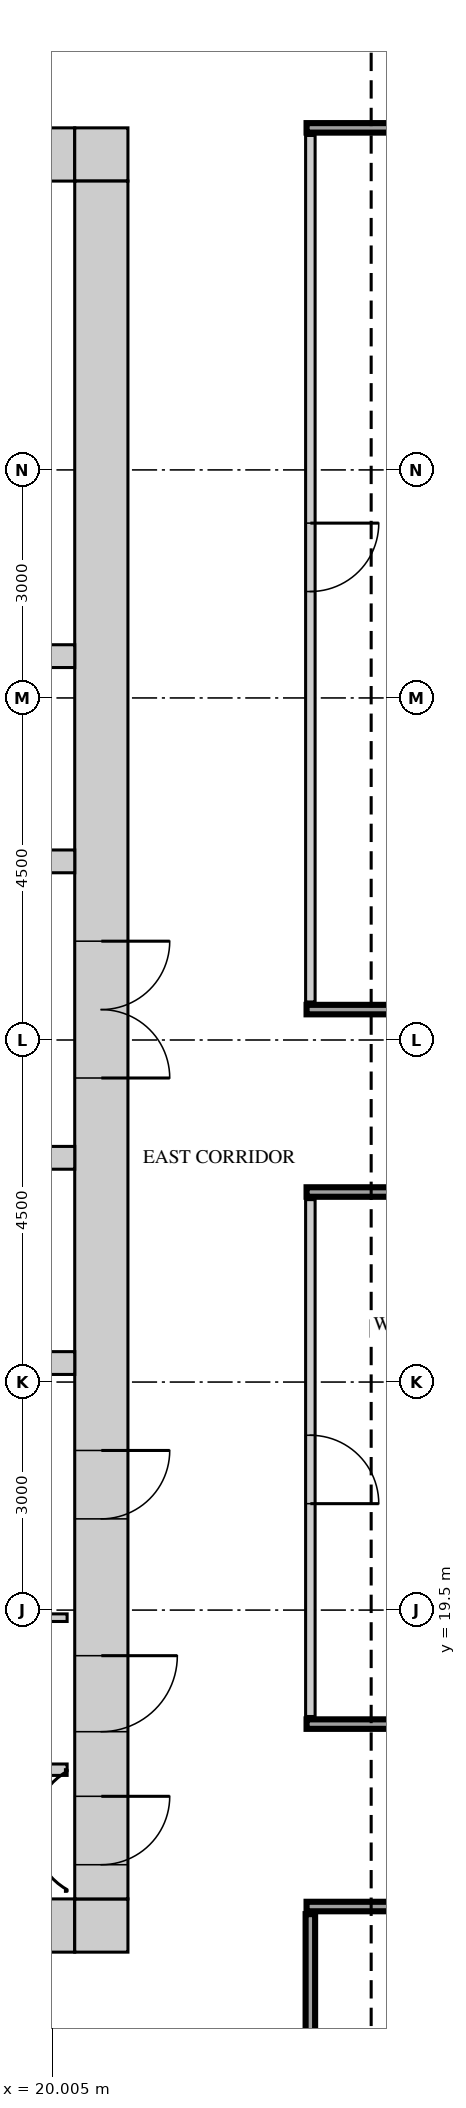
"""IFC4 building model, lengths in metres.
Left out: names, types, materials, properties, quantities, classifications, styles, units other than length and angle.
Written with IfcOpenShell. Run it as: python <this file> out.ifc"""

import sys

from ifc_helpers import new_model, si_unit, direction, frame, frame_2d, origin, place, context, subcontext, project, spatial, rectangle, extrude, source, transform, mapped, element, fill, save


model = new_model("IFC4")
c1 = context("Model", 3, precision=1e-05, world=origin(), true_north=direction((0.0, 1.0)))
c2 = subcontext(c1, "Body", "Model", "MODEL_VIEW")
j1 = project(units=[si_unit("LENGTHUNIT", "METRE"), si_unit("PLANEANGLEUNIT", "RADIAN")], contexts=[c1])
p1 = place(None, origin())
s1 = spatial("IfcSite", under=j1, at=p1, CompositionType="ELEMENT")
p2 = place(p1, origin())
s2 = spatial("IfcBuilding", under=s1, at=p2, CompositionType="ELEMENT")
p3 = place(p2, frame((0.0, 0.0, 238.2)))
s3 = spatial("IfcBuildingStorey", under=s2, at=p3, CompositionType="ELEMENT", Elevation=238.2)
m1 = source(origin(), c2, "Body", "SweptSolid", [
    extrude(rectangle(XDim=13.6, YDim=0.7, at=frame_2d((6.8, 0.0))), origin(), (0.0, 0.0, 1.0), 3.75),
])
p4 = place(p3, frame((6.7, 38.65, 0.0), z_axis=(0.0, 0.0, 1.0), x_axis=(1.0, 0.0, 0.0)))
e1 = element("IfcWall", 1, at=p4, inside=s3, PredefinedType="SHEAR", context=c2, shape_type="MappedRepresentation", body=[
    mapped(m1, transform((0.0, 0.0, 0.0))),
])
m2 = source(origin(), c2, "Body", "SweptSolid", [
    extrude(rectangle(XDim=0.9, YDim=2.1, at=frame_2d((0.45, 1.05))), frame((0.0, 0.36, 0.0), z_axis=(0.0, -1.0, 0.0), x_axis=(1.0, 0.0, 0.0)), (0.0, 0.0, 1.0), 0.72),
])
p5 = place(p4, frame((1.85, 0.0, 0.0)))
e2 = element("IfcOpeningElement", 2, at=p5, cuts=e1, PredefinedType="OPENING", context=c2, shape_type="MappedRepresentation", body=[
    mapped(m2, transform((0.0, 0.0, 0.0))),
])
p6 = place(p4, frame((6.3, 0.0, 0.0)))
e3 = element("IfcOpeningElement", 3, at=p6, cuts=e1, PredefinedType="OPENING", context=c2, shape_type="MappedRepresentation", body=[
    mapped(m2, transform((0.0, 0.0, 0.0))),
])
p7 = place(p4, frame((10.8, 0.0, 0.0)))
e4 = element("IfcOpeningElement", 4, at=p7, cuts=e1, PredefinedType="OPENING", context=c2, shape_type="MappedRepresentation", body=[
    mapped(m2, transform((0.0, 0.0, 0.0))),
])
m3 = source(origin(), c2, "Body", "SweptSolid", [
    extrude(rectangle(XDim=0.7, YDim=0.7, at=frame_2d((0.35, 0.0))), origin(), (0.0, 0.0, 1.0), 3.75),
])
p8 = place(p3, frame((20.3, 38.65, 0.0), z_axis=(0.0, 0.0, 1.0), x_axis=(1.0, 0.0, 0.0)))
e5 = element("IfcWall", 5, at=p8, inside=s3, PredefinedType="SHEAR", context=c2, shape_type="MappedRepresentation", body=[
    mapped(m3, transform((0.0, 0.0, 0.0))),
])
p9 = place(p3, frame((6.7, 15.35, 0.0), z_axis=(0.0, 0.0, 1.0), x_axis=(1.0, 0.0, 0.0)))
e6 = element("IfcWall", 6, at=p9, inside=s3, PredefinedType="SHEAR", context=c2, shape_type="MappedRepresentation", body=[
    mapped(m1, transform((0.0, 0.0, 0.0))),
])
m4 = source(origin(), c2, "Body", "SweptSolid", [
    extrude(rectangle(XDim=1.2, YDim=2.1, at=frame_2d((0.6, 1.05))), frame((0.0, 0.36, 0.0), z_axis=(0.0, -1.0, 0.0), x_axis=(1.0, 0.0, 0.0)), (0.0, 0.0, 1.0), 0.72),
])
p10 = place(p9, frame((5.5, 0.0, 0.0)))
e7 = element("IfcOpeningElement", 7, at=p10, cuts=e6, PredefinedType="OPENING", context=c2, shape_type="MappedRepresentation", body=[
    mapped(m4, transform((0.0, 0.0, 0.0))),
])
p11 = place(p9, frame((2.15, 0.0, 0.0)))
e8 = element("IfcOpeningElement", 8, at=p11, cuts=e6, PredefinedType="OPENING", context=c2, shape_type="MappedRepresentation", body=[
    mapped(m4, transform((0.0, 0.0, 0.0))),
])
m5 = source(origin(), c2, "Body", "SweptSolid", [
    extrude(rectangle(XDim=1.0, YDim=2.1, at=frame_2d((0.5, 1.05))), frame((0.0, 0.36, 0.0), z_axis=(0.0, -1.0, 0.0), x_axis=(1.0, 0.0, 0.0)), (0.0, 0.0, 1.0), 0.72),
])
p12 = place(p9, frame((8.0, 0.0, 0.0)))
e9 = element("IfcOpeningElement", 9, at=p12, cuts=e6, PredefinedType="OPENING", context=c2, shape_type="MappedRepresentation", body=[
    mapped(m5, transform((0.0, 0.0, 0.0))),
])
p13 = place(p3, frame((20.3, 15.35, 0.0), z_axis=(0.0, 0.0, 1.0), x_axis=(1.0, 0.0, 0.0)))
e10 = element("IfcWall", 10, at=p13, inside=s3, PredefinedType="SHEAR", context=c2, shape_type="MappedRepresentation", body=[
    mapped(m3, transform((0.0, 0.0, 0.0))),
])
m6 = source(origin(), c2, "Body", "SweptSolid", [
    extrude(rectangle(XDim=22.6, YDim=0.7, at=frame_2d((11.3, 0.0))), origin(), (0.0, 0.0, 1.0), 3.75),
])
p14 = place(p3, frame((20.65, 15.7, 0.0), z_axis=(0.0, 0.0, 1.0), x_axis=(0.0, 1.0, 0.0)))
e11 = element("IfcWall", 11, at=p14, inside=s3, PredefinedType="SHEAR", context=c2, shape_type="MappedRepresentation", body=[
    mapped(m6, transform((0.0, 0.0, 0.0))),
])
m7 = source(origin(), c2, "Body", "SweptSolid", [
    extrude(rectangle(XDim=1.8, YDim=2.1, at=frame_2d((0.9, 1.05))), frame((0.0, 0.36, 0.0), z_axis=(0.0, -1.0, 0.0), x_axis=(1.0, 0.0, 0.0)), (0.0, 0.0, 1.0), 0.72),
])
p15 = place(p14, frame((10.8, 0.0, 0.0)))
e12 = element("IfcOpeningElement", 12, at=p15, cuts=e11, PredefinedType="OPENING", context=c2, shape_type="MappedRepresentation", body=[
    mapped(m7, transform((0.0, 0.0, 0.0))),
])
p16 = place(p14, frame((0.45, 0.0, 0.0)))
e13 = element("IfcOpeningElement", 13, at=p16, cuts=e11, PredefinedType="OPENING", context=c2, shape_type="MappedRepresentation", body=[
    mapped(m2, transform((0.0, 0.0, 0.0))),
])
p17 = place(p14, frame((2.2, 0.0, 0.0)))
e14 = element("IfcOpeningElement", 14, at=p17, cuts=e11, PredefinedType="OPENING", context=c2, shape_type="MappedRepresentation", body=[
    mapped(m5, transform((0.0, 0.0, 0.0))),
])
p18 = place(p14, frame((5.0, 0.0, 0.0)))
e15 = element("IfcOpeningElement", 15, at=p18, cuts=e11, PredefinedType="OPENING", context=c2, shape_type="MappedRepresentation", body=[
    mapped(m2, transform((0.0, 0.0, 0.0))),
])
m8 = source(origin(), c2, "Body", "SweptSolid", [
    extrude(rectangle(XDim=13.6, YDim=0.3, at=frame_2d((6.8, 0.0))), origin(), (0.0, 0.0, 1.0), 3.75),
])
for number, where, z_axis, x_axis in (
    (16, (6.7, 22.75, 0.0), (0.0, 0.0, 1.0), (1.0, 0.0, 0.0)),
    (17, (6.7, 32.05, 0.0), (0.0, 0.0, 1.0), (1.0, 0.0, 0.0)),
):
    element("IfcWall", number, at=place(p3, frame(where, z_axis=z_axis, x_axis=x_axis)), inside=s3, PredefinedType="STANDARD", context=c2, shape_type="MappedRepresentation", body=[
        mapped(m8, transform((0.0, 0.0, 0.0))),
    ])
p19 = place(p3, frame((6.7, 29.35, 0.0), z_axis=(0.0, 0.0, 1.0), x_axis=(1.0, 0.0, 0.0)))
e18 = element("IfcWall", 18, at=p19, inside=s3, PredefinedType="STANDARD", context=c2, shape_type="MappedRepresentation", body=[
    mapped(m8, transform((0.0, 0.0, 0.0))),
])
m9 = source(origin(), c2, "Body", "SweptSolid", [
    extrude(rectangle(XDim=1.2, YDim=2.1, at=frame_2d((0.6, 1.05))), frame((0.0, 0.16, 0.0), z_axis=(0.0, -1.0, 0.0), x_axis=(1.0, 0.0, 0.0)), (0.0, 0.0, 1.0), 0.32),
])
p20 = place(p19, frame((1.05, 0.0, 0.0)))
e19 = element("IfcOpeningElement", 19, at=p20, cuts=e18, PredefinedType="OPENING", context=c2, shape_type="MappedRepresentation", body=[
    mapped(m9, transform((0.0, 0.0, 0.0))),
])
p21 = place(p19, frame((3.6, 0.0, 0.0)))
e20 = element("IfcOpeningElement", 20, at=p21, cuts=e18, PredefinedType="OPENING", context=c2, shape_type="MappedRepresentation", body=[
    mapped(m9, transform((0.0, 0.0, 0.0))),
])
p22 = place(p19, frame((6.15, 0.0, 0.0)))
e21 = element("IfcOpeningElement", 21, at=p22, cuts=e18, PredefinedType="OPENING", context=c2, shape_type="MappedRepresentation", body=[
    mapped(m9, transform((0.0, 0.0, 0.0))),
])
p23 = place(p19, frame((8.7, 0.0, 0.0)))
e22 = element("IfcOpeningElement", 22, at=p23, cuts=e18, PredefinedType="OPENING", context=c2, shape_type="MappedRepresentation", body=[
    mapped(m9, transform((0.0, 0.0, 0.0))),
])
p24 = place(p19, frame((11.25, 0.0, 0.0)))
e23 = element("IfcOpeningElement", 23, at=p24, cuts=e18, PredefinedType="OPENING", context=c2, shape_type="MappedRepresentation", body=[
    mapped(m9, transform((0.0, 0.0, 0.0))),
])
p25 = place(p3, frame((6.7, 25.45, 0.0), z_axis=(0.0, 0.0, 1.0), x_axis=(1.0, 0.0, 0.0)))
e24 = element("IfcWall", 24, at=p25, inside=s3, PredefinedType="STANDARD", context=c2, shape_type="MappedRepresentation", body=[
    mapped(m8, transform((0.0, 0.0, 0.0))),
])
p26 = place(p25, frame((1.05, 0.0, 0.0)))
e25 = element("IfcOpeningElement", 25, at=p26, cuts=e24, PredefinedType="OPENING", context=c2, shape_type="MappedRepresentation", body=[
    mapped(m9, transform((0.0, 0.0, 0.0))),
])
p27 = place(p25, frame((3.6, 0.0, 0.0)))
e26 = element("IfcOpeningElement", 26, at=p27, cuts=e24, PredefinedType="OPENING", context=c2, shape_type="MappedRepresentation", body=[
    mapped(m9, transform((0.0, 0.0, 0.0))),
])
p28 = place(p25, frame((6.15, 0.0, 0.0)))
e27 = element("IfcOpeningElement", 27, at=p28, cuts=e24, PredefinedType="OPENING", context=c2, shape_type="MappedRepresentation", body=[
    mapped(m9, transform((0.0, 0.0, 0.0))),
])
p29 = place(p25, frame((8.7, 0.0, 0.0)))
e28 = element("IfcOpeningElement", 28, at=p29, cuts=e24, PredefinedType="OPENING", context=c2, shape_type="MappedRepresentation", body=[
    mapped(m9, transform((0.0, 0.0, 0.0))),
])
p30 = place(p25, frame((11.25, 0.0, 0.0)))
e29 = element("IfcOpeningElement", 29, at=p30, cuts=e24, PredefinedType="OPENING", context=c2, shape_type="MappedRepresentation", body=[
    mapped(m9, transform((0.0, 0.0, 0.0))),
])
m10 = source(origin(), c2, "Body", "SweptSolid", [
    extrude(rectangle(XDim=10.85, YDim=0.125, at=frame_2d((5.425, 0.0))), origin(), (0.0, 0.0, 1.0), 3.8),
])
p31 = place(p3, frame((23.4, 4.65, 0.0), z_axis=(0.0, 0.0, 1.0), x_axis=(0.0, 1.0, 0.0)))
e30 = element("IfcWall", 30, at=p31, inside=s3, PredefinedType="PARTITIONING", context=c2, shape_type="MappedRepresentation", body=[
    mapped(m10, transform((0.0, 0.0, 0.0))),
])
m11 = source(origin(), c2, "Body", "SweptSolid", [
    extrude(rectangle(XDim=26.0, YDim=0.125, at=frame_2d((13.0, 0.0))), origin(), (0.0, 0.0, 1.0), 3.8),
])
p32 = place(p3, frame((23.35, 15.6, 0.0), z_axis=(0.0, 0.0, 1.0), x_axis=(1.0, 0.0, 0.0)))
e31 = element("IfcWall", 31, at=p32, inside=s3, PredefinedType="PARTITIONING", context=c2, shape_type="MappedRepresentation", body=[
    mapped(m11, transform((0.0, 0.0, 0.0))),
])
m12 = source(origin(), c2, "Body", "SweptSolid", [
    extrude(rectangle(XDim=1.2, YDim=2.1, at=frame_2d((0.6, 1.05))), frame((0.0, 0.073, 0.0), z_axis=(0.0, -1.0, 0.0), x_axis=(1.0, 0.0, 0.0)), (0.0, 0.0, 1.0), 0.145),
])
p33 = place(p32, frame((5.0, 0.0, 0.0)))
e32 = element("IfcOpeningElement", 32, at=p33, cuts=e31, PredefinedType="OPENING", context=c2, shape_type="MappedRepresentation", body=[
    mapped(m12, transform((0.0, 0.0, 0.0))),
])
m13 = source(origin(), c2, "Body", "SweptSolid", [
    extrude(rectangle(XDim=0.9, YDim=2.1, at=frame_2d((0.45, 1.05))), frame((0.0, 0.073, 0.0), z_axis=(0.0, -1.0, 0.0), x_axis=(1.0, 0.0, 0.0)), (0.0, 0.0, 1.0), 0.145),
])
p34 = place(p32, frame((15.1, 0.0, 0.0)))
e33 = element("IfcOpeningElement", 33, at=p34, cuts=e31, PredefinedType="OPENING", context=c2, shape_type="MappedRepresentation", body=[
    mapped(m13, transform((0.0, 0.0, 0.0))),
])
p35 = place(p32, frame((22.6, 0.0, 0.0)))
e34 = element("IfcOpeningElement", 34, at=p35, cuts=e31, PredefinedType="OPENING", context=c2, shape_type="MappedRepresentation", body=[
    mapped(m13, transform((0.0, 0.0, 0.0))),
])
m14 = source(origin(), c2, "Body", "SweptSolid", [
    extrude(rectangle(XDim=4.0, YDim=0.15, at=frame_2d((2.0, 0.0))), origin(), (0.0, 0.0, 1.0), 3.8),
])
p36 = place(p3, frame((16.2, 17.4, 0.0), z_axis=(0.0, 0.0, 1.0), x_axis=(1.0, 0.0, 0.0)))
e35 = element("IfcWall", 35, at=p36, inside=s3, PredefinedType="PARTITIONING", context=c2, shape_type="MappedRepresentation", body=[
    mapped(m14, transform((0.0, 0.0, 0.0))),
])
p37 = place(p3, frame((23.35, 18.0, 0.0), z_axis=(0.0, 0.0, 1.0), x_axis=(1.0, 0.0, 0.0)))
e36 = element("IfcWall", 36, at=p37, inside=s3, PredefinedType="PARTITIONING", context=c2, shape_type="MappedRepresentation", body=[
    mapped(m11, transform((0.0, 0.0, 0.0))),
])
p38 = place(p37, frame((4.05, 0.0, 0.0)))
e37 = element("IfcOpeningElement", 37, at=p38, cuts=e36, PredefinedType="OPENING", context=c2, shape_type="MappedRepresentation", body=[
    mapped(m13, transform((0.0, 0.0, 0.0))),
])
m15 = source(origin(), c2, "Body", "SweptSolid", [
    extrude(rectangle(XDim=1.0, YDim=2.1, at=frame_2d((0.5, 1.05))), frame((0.0, 0.073, 0.0), z_axis=(0.0, -1.0, 0.0), x_axis=(1.0, 0.0, 0.0)), (0.0, 0.0, 1.0), 0.145),
])
p39 = place(p37, frame((7.4, 0.0, 0.0)))
e38 = element("IfcOpeningElement", 38, at=p39, cuts=e36, PredefinedType="OPENING", context=c2, shape_type="MappedRepresentation", body=[
    mapped(m15, transform((0.0, 0.0, 0.0))),
])
p40 = place(p37, frame((12.55, 0.0, 0.0)))
e39 = element("IfcOpeningElement", 39, at=p40, cuts=e36, PredefinedType="OPENING", context=c2, shape_type="MappedRepresentation", body=[
    mapped(m13, transform((0.0, 0.0, 0.0))),
])
p41 = place(p37, frame((20.8, 0.0, 0.0)))
e40 = element("IfcOpeningElement", 40, at=p41, cuts=e36, PredefinedType="OPENING", context=c2, shape_type="MappedRepresentation", body=[
    mapped(m13, transform((0.0, 0.0, 0.0))),
])
m16 = source(origin(), c2, "Body", "SweptSolid", [
    extrude(rectangle(XDim=6.8, YDim=0.125, at=frame_2d((3.4, 0.0))), origin(), (0.0, 0.0, 1.0), 3.8),
])
p42 = place(p3, frame((23.4, 18.1, 0.0), z_axis=(0.0, 0.0, 1.0), x_axis=(0.0, 1.0, 0.0)))
e41 = element("IfcWall", 41, at=p42, inside=s3, PredefinedType="PARTITIONING", context=c2, shape_type="MappedRepresentation", body=[
    mapped(m16, transform((0.0, 0.0, 0.0))),
])
p43 = place(p42, frame((2.8, 0.0, 0.0)))
e42 = element("IfcOpeningElement", 42, at=p43, cuts=e41, PredefinedType="OPENING", context=c2, shape_type="MappedRepresentation", body=[
    mapped(m13, transform((0.0, 0.0, 0.0))),
])
m17 = source(origin(), c2, "Body", "SweptSolid", [
    extrude(rectangle(XDim=4.1, YDim=0.1, at=frame_2d((2.05, 0.0))), origin(), (0.0, 0.0, 1.0), 3.8),
])
p44 = place(p3, frame((16.1, 19.4, 0.0), z_axis=(0.0, 0.0, 1.0), x_axis=(1.0, 0.0, 0.0)))
e43 = element("IfcWall", 43, at=p44, inside=s3, PredefinedType="PARTITIONING", context=c2, shape_type="MappedRepresentation", body=[
    mapped(m17, transform((0.0, 0.0, 0.0))),
])
p45 = place(p3, frame((23.35, 25.0, 0.0), z_axis=(0.0, 0.0, 1.0), x_axis=(1.0, 0.0, 0.0)))
e44 = element("IfcWall", 44, at=p45, inside=s3, PredefinedType="PARTITIONING", context=c2, shape_type="MappedRepresentation", body=[
    mapped(m11, transform((0.0, 0.0, 0.0))),
])
p46 = place(p3, frame((23.35, 27.4, 0.0), z_axis=(0.0, 0.0, 1.0), x_axis=(1.0, 0.0, 0.0)))
e45 = element("IfcWall", 45, at=p46, inside=s3, PredefinedType="PARTITIONING", context=c2, shape_type="MappedRepresentation", body=[
    mapped(m11, transform((0.0, 0.0, 0.0))),
])
p47 = place(p46, frame((13.0, 0.0, 0.0)))
e46 = element("IfcOpeningElement", 46, at=p47, cuts=e45, PredefinedType="OPENING", context=c2, shape_type="MappedRepresentation", body=[
    mapped(m12, transform((0.0, 0.0, 0.0))),
])
p48 = place(p46, frame((22.6, 0.0, 0.0)))
e47 = element("IfcOpeningElement", 47, at=p48, cuts=e45, PredefinedType="OPENING", context=c2, shape_type="MappedRepresentation", body=[
    mapped(m13, transform((0.0, 0.0, 0.0))),
])
m18 = source(origin(), c2, "Body", "SweptSolid", [
    extrude(rectangle(XDim=11.4, YDim=0.125, at=frame_2d((5.7, 0.0))), origin(), (0.0, 0.0, 1.0), 3.8),
])
p49 = place(p3, frame((23.4, 27.5, 0.0), z_axis=(0.0, 0.0, 1.0), x_axis=(0.0, 1.0, 0.0)))
e48 = element("IfcWall", 48, at=p49, inside=s3, PredefinedType="PARTITIONING", context=c2, shape_type="MappedRepresentation", body=[
    mapped(m18, transform((0.0, 0.0, 0.0))),
])
p50 = place(p49, frame((5.4, 0.0, 0.0)))
e49 = element("IfcOpeningElement", 49, at=p50, cuts=e48, PredefinedType="OPENING", context=c2, shape_type="MappedRepresentation", body=[
    mapped(m13, transform((0.0, 0.0, 0.0))),
])
m19 = source(origin(), c2, "Body", "SweptSolid", [
    extrude(rectangle(XDim=7.1, YDim=0.125, at=frame_2d((3.55, 0.0))), origin(), (0.0, 0.0, 1.0), 3.8),
])
p51 = place(p3, frame((23.35, 39.0, 0.0), z_axis=(0.0, 0.0, 1.0), x_axis=(1.0, 0.0, 0.0)))
e50 = element("IfcWall", 50, at=p51, inside=s3, PredefinedType="PARTITIONING", context=c2, shape_type="MappedRepresentation", body=[
    mapped(m19, transform((0.0, 0.0, 0.0))),
])
m20 = source(origin(), c2, "Body", "SweptSolid", [
    extrude(rectangle(XDim=1.8, YDim=2.1, at=frame_2d((0.9, 1.05))), frame((0.0, 0.3, 0.0), z_axis=(0.0, -1.0, 0.0), x_axis=(1.0, 0.0, 0.0)), (0.0, 0.0, 1.0), 0.6),
])
p52 = place(p15, origin())
e51 = element("IfcDoor", 51, at=p52, inside=s3, OperationType="DOUBLE_DOOR_SINGLE_SWING", PredefinedType="DOOR", context=c2, shape_type="MappedRepresentation", body=[
    mapped(m20, transform((0.0, 0.0, 0.0))),
])
fill(e12, e51)
m21 = source(origin(), c2, "Body", "SweptSolid", [
    extrude(rectangle(XDim=0.9, YDim=2.1, at=frame_2d((0.45, 1.05))), frame((0.0, 0.3, 0.0), z_axis=(0.0, -1.0, 0.0), x_axis=(1.0, 0.0, 0.0)), (0.0, 0.0, 1.0), 0.6),
])
p53 = place(p16, origin())
e52 = element("IfcDoor", 52, at=p53, inside=s3, OperationType="SINGLE_SWING_RIGHT", PredefinedType="DOOR", context=c2, shape_type="MappedRepresentation", body=[
    mapped(m21, transform((0.0, 0.0, 0.0))),
])
fill(e13, e52)
m22 = source(origin(), c2, "Body", "SweptSolid", [
    extrude(rectangle(XDim=1.0, YDim=2.1, at=frame_2d((0.5, 1.05))), frame((0.0, 0.3, 0.0), z_axis=(0.0, -1.0, 0.0), x_axis=(1.0, 0.0, 0.0)), (0.0, 0.0, 1.0), 0.6),
])
p54 = place(p17, origin())
e53 = element("IfcDoor", 53, at=p54, inside=s3, OperationType="SINGLE_SWING_RIGHT", PredefinedType="DOOR", context=c2, shape_type="MappedRepresentation", body=[
    mapped(m22, transform((0.0, 0.0, 0.0))),
])
fill(e14, e53)
p55 = place(p18, origin())
e54 = element("IfcDoor", 54, at=p55, inside=s3, OperationType="SINGLE_SWING_RIGHT", PredefinedType="DOOR", context=c2, shape_type="MappedRepresentation", body=[
    mapped(m21, transform((0.0, 0.0, 0.0))),
])
fill(e15, e54)
m23 = source(origin(), c2, "Body", "SweptSolid", [
    extrude(rectangle(XDim=0.9, YDim=2.1, at=frame_2d((0.45, 1.05))), frame((0.0, 0.025, 0.0), z_axis=(0.0, -1.0, 0.0), x_axis=(1.0, 0.0, 0.0)), (0.0, 0.0, 1.0), 0.05),
])
p56 = place(p43, origin())
e55 = element("IfcDoor", 55, at=p56, inside=s3, OperationType="SINGLE_SWING_LEFT", PredefinedType="DOOR", context=c2, shape_type="MappedRepresentation", body=[
    mapped(m23, transform((0.0, 0.0, 0.0))),
])
fill(e42, e55)
p57 = place(p50, origin())
e56 = element("IfcDoor", 56, at=p57, inside=s3, OperationType="SINGLE_SWING_RIGHT", PredefinedType="DOOR", context=c2, shape_type="MappedRepresentation", body=[
    mapped(m23, transform((0.0, 0.0, 0.0))),
])
fill(e49, e56)
save(model, sys.argv[1])
